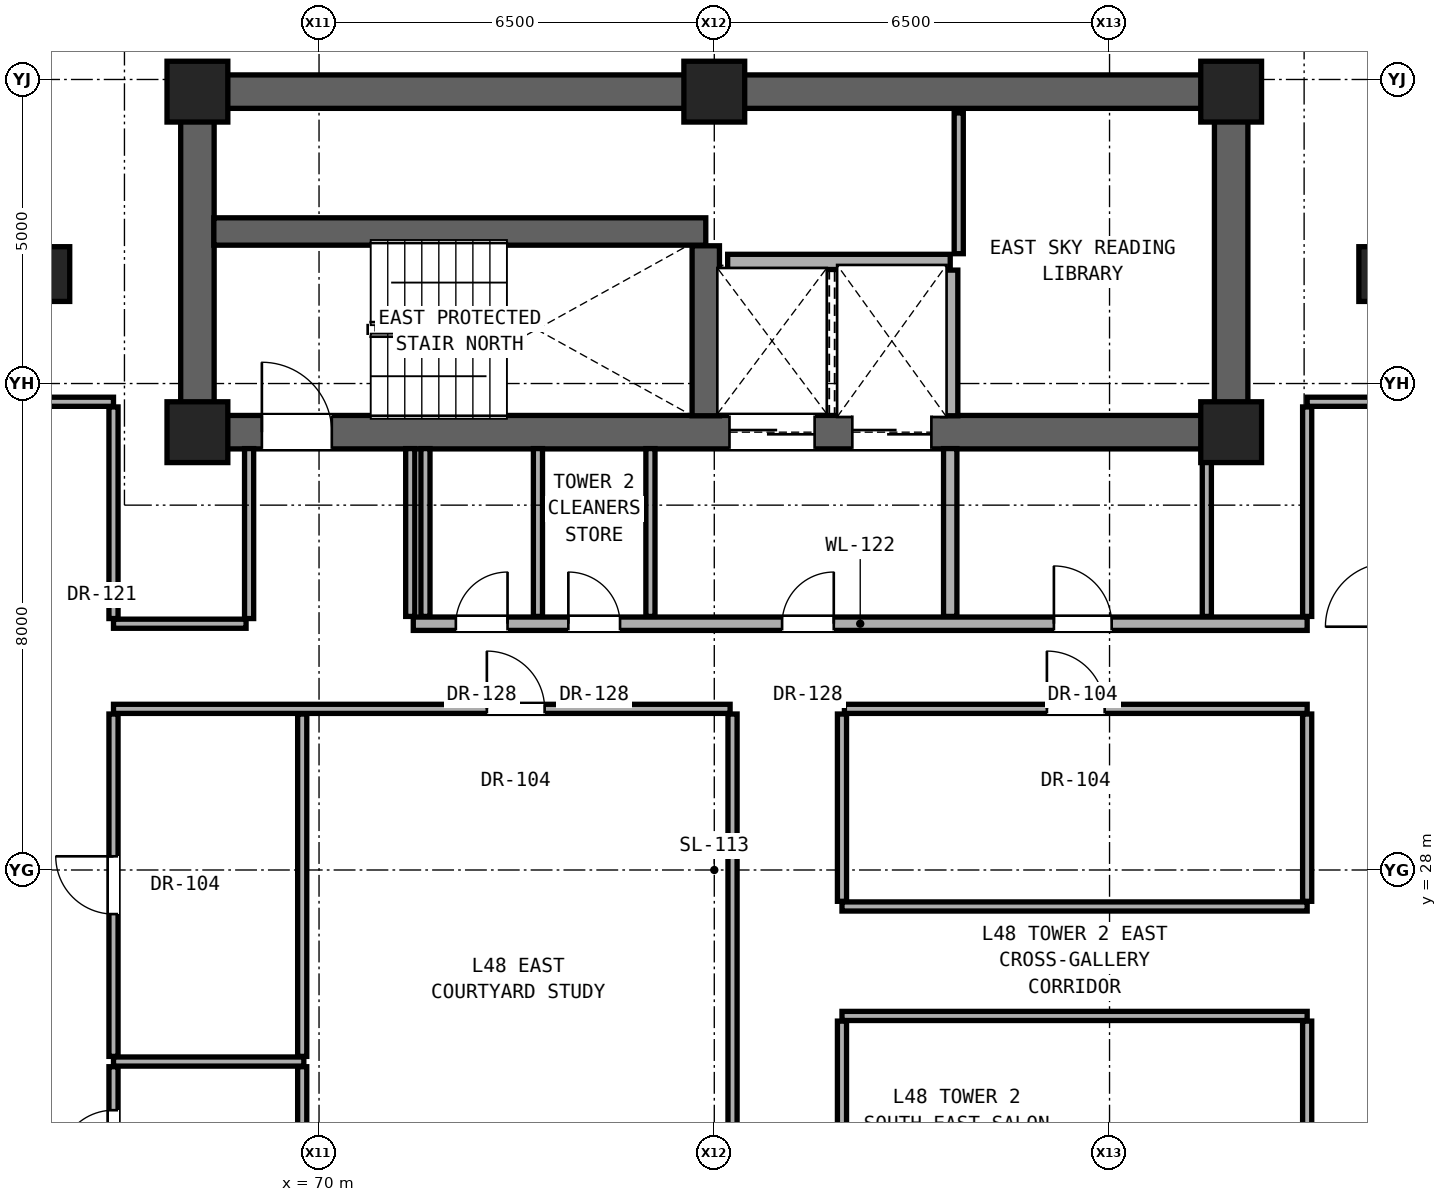
"""IFC4 building model, lengths in metres.
Left out: names, types, materials, properties, quantities, classifications, styles, units other than length and angle.
Written with IfcOpenShell. Run it as: python <this file> out.ifc"""

import sys

from ifc_helpers import new_model, si_unit, direction, frame, frame_2d, origin, origin_2d, place, context, subcontext, project, spatial, rectangle, extrude, element, fill, save


model = new_model("IFC4")
c1 = context("Model", 3, precision=1e-05, world=origin(), true_north=direction((0.0, 1.0)))
c2 = subcontext(c1, "Body", "Model", "MODEL_VIEW")
j1 = project(units=[si_unit("LENGTHUNIT", "METRE"), si_unit("PLANEANGLEUNIT", "RADIAN")], contexts=[c1])
p1 = place(None, origin())
s1 = spatial("IfcSite", under=j1, at=p1, CompositionType="ELEMENT")
p2 = place(p1, origin())
s2 = spatial("IfcBuilding", under=s1, at=p2, CompositionType="ELEMENT")
p3 = place(p2, frame((0.0, 0.0, 170.65)))
s3 = spatial("IfcBuildingStorey", under=s2, at=p3, CompositionType="ELEMENT", Elevation=170.65)
for number, where, z_axis, x_axis in (
    (1, (68.0, 35.2, 0.0), (0.0, 0.0, 1.0), (1.0, 0.0, 0.0)),
    (2, (85.0, 35.2, 0.0), (0.0, 0.0, 1.0), (1.0, 0.0, 0.0)),
    (3, (68.0, 40.8, 0.0), (0.0, 0.0, 1.0), (1.0, 0.0, 0.0)),
    (4, (76.5, 40.8, 0.0), (0.0, 0.0, 1.0), (1.0, 0.0, 0.0)),
    (5, (85.0, 40.8, 0.0), (0.0, 0.0, 1.0), (1.0, 0.0, 0.0)),
):
    element("IfcColumn", number, at=place(p3, frame(where, z_axis=z_axis, x_axis=x_axis)), inside=s3, PredefinedType="COLUMN", context=c2, shape_type="SweptSolid", body=[
        extrude(rectangle(XDim=1.0, YDim=1.0, at=origin_2d()), origin(), (0.0, 0.0, 1.0), 3.25),
    ])
for number, where, z_axis, x_axis in (
    (6, (65.6, 37.8, 0.0), (0.0, 0.0, 1.0), (1.0, 0.0, 0.0)),
    (7, (87.4, 37.8, 0.0), (0.0, 0.0, 1.0), (1.0, 0.0, 0.0)),
):
    element("IfcColumn", number, at=place(p3, frame(where, z_axis=z_axis, x_axis=x_axis)), inside=s3, PredefinedType="PILASTER", context=c2, shape_type="SweptSolid", body=[
        extrude(rectangle(XDim=0.6, YDim=0.9, at=origin_2d()), origin(), (0.0, 0.0, 1.0), 3.25),
    ])
p4 = place(p3, frame((68.0, 40.8, 0.0), z_axis=(0.0, 0.0, 1.0), x_axis=(1.0, 0.0, 0.0)))
e8 = element("IfcWall", 8, at=p4, inside=s3, PredefinedType="SHEAR", context=c2, shape_type="SweptSolid", body=[
    extrude(rectangle(XDim=17.0, YDim=0.55, at=frame_2d((8.5, 0.0))), origin(), (0.0, 0.0, 1.0), 3.05),
])
for number, where, z_axis, x_axis in (
    (9, (68.0, 35.2, 0.0), (0.0, 0.0, 1.0), (0.0, 1.0, 0.0)),
    (10, (85.0, 35.2, 0.0), (0.0, 0.0, 1.0), (0.0, 1.0, 0.0)),
):
    element("IfcWall", number, at=place(p3, frame(where, z_axis=z_axis, x_axis=x_axis)), inside=s3, PredefinedType="SHEAR", context=c2, shape_type="SweptSolid", body=[
        extrude(rectangle(XDim=5.6, YDim=0.55, at=frame_2d((2.8, 0.0))), origin(), (0.0, 0.0, 1.0), 3.05),
    ])
p5 = place(p3, frame((68.0, 35.2, 0.0), z_axis=(0.0, 0.0, 1.0), x_axis=(1.0, 0.0, 0.0)))
e11 = element("IfcWall", 11, at=p5, inside=s3, PredefinedType="SHEAR", context=c2, shape_type="SweptSolid", body=[
    extrude(rectangle(XDim=17.0, YDim=0.55, at=frame_2d((8.5, 0.0))), origin(), (0.0, 0.0, 1.0), 3.05),
])
p6 = place(p5, frame((1.06, 0.0, 0.0)))
e12 = element("IfcOpeningElement", 12, at=p6, cuts=e11, PredefinedType="OPENING", context=c2, shape_type="SweptSolid", body=[
    extrude(rectangle(XDim=1.15, YDim=2.2, at=frame_2d((0.575, 1.1))), frame((0.0, 0.285, 0.0), z_axis=(0.0, -1.0, 0.0), x_axis=(1.0, 0.0, 0.0)), (0.0, 0.0, 1.0), 0.57),
])
p7 = place(p5, frame((8.75, 0.0, 0.0)))
e13 = element("IfcOpeningElement", 13, at=p7, cuts=e11, PredefinedType="OPENING", context=c2, shape_type="SweptSolid", body=[
    extrude(rectangle(XDim=1.4, YDim=2.35, at=frame_2d((0.7, 1.175))), frame((0.0, 0.285, 0.0), z_axis=(0.0, -1.0, 0.0), x_axis=(1.0, 0.0, 0.0)), (0.0, 0.0, 1.0), 0.57),
])
p8 = place(p5, frame((10.77, 0.0, 0.0)))
e14 = element("IfcOpeningElement", 14, at=p8, cuts=e11, PredefinedType="OPENING", context=c2, shape_type="SweptSolid", body=[
    extrude(rectangle(XDim=1.3, YDim=2.3, at=frame_2d((0.65, 1.15))), frame((0.0, 0.285, 0.0), z_axis=(0.0, -1.0, 0.0), x_axis=(1.0, 0.0, 0.0)), (0.0, 0.0, 1.0), 0.57),
])
p9 = place(p3, frame((66.62, 24.85, 0.0), z_axis=(0.0, 0.0, 1.0), x_axis=(1.0, 0.0, 0.0)))
e15 = element("IfcWall", 15, at=p9, inside=s3, PredefinedType="PARTITIONING", context=c2, shape_type="SweptSolid", body=[
    extrude(rectangle(XDim=3.13, YDim=0.15, at=frame_2d((1.565, 0.0))), origin(), (0.0, 0.0, 1.0), 2.186),
])
for number, where, z_axis, x_axis in (
    (16, (78.6, 25.6, 0.0), (0.0, 0.0, 1.0), (1.0, 0.0, 0.0)),
    (17, (78.6, 27.4, 0.0), (0.0, 0.0, 1.0), (1.0, 0.0, 0.0)),
):
    element("IfcWall", number, at=place(p3, frame(where, z_axis=z_axis, x_axis=x_axis)), inside=s3, PredefinedType="PARTITIONING", context=c2, shape_type="SweptSolid", body=[
        extrude(rectangle(XDim=7.65, YDim=0.15, at=frame_2d((3.825, 0.0))), origin(), (0.0, 0.0, 1.0), 2.186),
    ])
p10 = place(p3, frame((66.62, 30.65, 0.0), z_axis=(0.0, 0.0, 1.0), x_axis=(1.0, 0.0, 0.0)))
e18 = element("IfcWall", 18, at=p10, inside=s3, PredefinedType="PARTITIONING", context=c2, shape_type="SweptSolid", body=[
    extrude(rectangle(XDim=10.14, YDim=0.15, at=frame_2d((5.07, 0.0))), origin(), (0.0, 0.0, 1.0), 2.186),
])
p11 = place(p10, frame((6.14, 0.0, 0.0)))
e19 = element("IfcOpeningElement", 19, at=p11, cuts=e18, PredefinedType="OPENING", context=c2, shape_type="SweptSolid", body=[
    extrude(rectangle(XDim=0.95, YDim=2.15, at=frame_2d((0.475, 1.075))), frame((0.0, 0.085, 0.0), z_axis=(0.0, -1.0, 0.0), x_axis=(1.0, 0.0, 0.0)), (0.0, 0.0, 1.0), 0.17),
])
p12 = place(p3, frame((78.64, 30.65, 0.0), z_axis=(0.0, 0.0, 1.0), x_axis=(1.0, 0.0, 0.0)))
e20 = element("IfcWall", 20, at=p12, inside=s3, PredefinedType="PARTITIONING", context=c2, shape_type="SweptSolid", body=[
    extrude(rectangle(XDim=7.61, YDim=0.15, at=frame_2d((3.805, 0.0))), origin(), (0.0, 0.0, 1.0), 2.186),
])
p13 = place(p12, frame((3.33, 0.0, 0.0)))
e21 = element("IfcOpeningElement", 21, at=p13, cuts=e20, PredefinedType="OPENING", context=c2, shape_type="SweptSolid", body=[
    extrude(rectangle(XDim=0.95, YDim=2.15, at=frame_2d((0.475, 1.075))), frame((0.0, 0.085, 0.0), z_axis=(0.0, -1.0, 0.0), x_axis=(1.0, 0.0, 0.0)), (0.0, 0.0, 1.0), 0.17),
])
p14 = place(p3, frame((66.62, 32.05, 0.0), z_axis=(0.0, 0.0, 1.0), x_axis=(1.0, 0.0, 0.0)))
e22 = element("IfcWall", 22, at=p14, inside=s3, PredefinedType="PARTITIONING", context=c2, shape_type="SweptSolid", body=[
    extrude(rectangle(XDim=2.18, YDim=0.15, at=frame_2d((1.09, 0.0))), origin(), (0.0, 0.0, 1.0), 2.186),
])
p15 = place(p3, frame((71.55, 32.05, 0.0), z_axis=(0.0, 0.0, 1.0), x_axis=(1.0, 0.0, 0.0)))
e23 = element("IfcWall", 23, at=p15, inside=s3, PredefinedType="SOLIDWALL", context=c2, shape_type="SweptSolid", body=[
    extrude(rectangle(XDim=14.7, YDim=0.22, at=frame_2d((7.35, 0.0))), origin(), (0.0, 0.0, 1.0), 2.186),
])
p16 = place(p15, frame((6.065, 0.0, 0.0)))
e24 = element("IfcOpeningElement", 24, at=p16, cuts=e23, PredefinedType="OPENING", context=c2, shape_type="SweptSolid", body=[
    extrude(rectangle(XDim=0.85, YDim=2.01, at=frame_2d((0.425, 1.005))), frame((0.0, 0.12, 0.0), z_axis=(0.0, -1.0, 0.0), x_axis=(1.0, 0.0, 0.0)), (0.0, 0.0, 1.0), 0.24),
])
p17 = place(p15, frame((10.535, 0.0, 0.0)))
e25 = element("IfcOpeningElement", 25, at=p17, cuts=e23, PredefinedType="OPENING", context=c2, shape_type="SweptSolid", body=[
    extrude(rectangle(XDim=0.95, YDim=2.15, at=frame_2d((0.475, 1.075))), frame((0.0, 0.12, 0.0), z_axis=(0.0, -1.0, 0.0), x_axis=(1.0, 0.0, 0.0)), (0.0, 0.0, 1.0), 0.24),
])
p18 = place(p15, frame((0.7, 0.0, 0.0)))
e26 = element("IfcOpeningElement", 26, at=p18, cuts=e23, PredefinedType="OPENING", context=c2, shape_type="SweptSolid", body=[
    extrude(rectangle(XDim=0.85, YDim=2.01, at=frame_2d((0.425, 1.005))), frame((0.0, 0.12, 0.0), z_axis=(0.0, -1.0, 0.0), x_axis=(1.0, 0.0, 0.0)), (0.0, 0.0, 1.0), 0.24),
])
p19 = place(p15, frame((2.55, 0.0, 0.0)))
e27 = element("IfcOpeningElement", 27, at=p19, cuts=e23, PredefinedType="OPENING", context=c2, shape_type="SweptSolid", body=[
    extrude(rectangle(XDim=0.85, YDim=2.01, at=frame_2d((0.425, 1.005))), frame((0.0, 0.12, 0.0), z_axis=(0.0, -1.0, 0.0), x_axis=(1.0, 0.0, 0.0)), (0.0, 0.0, 1.0), 0.24),
])
p20 = place(p3, frame((65.25, 35.7, 0.0), z_axis=(0.0, 0.0, 1.0), x_axis=(1.0, 0.0, 0.0)))
e28 = element("IfcWall", 28, at=p20, inside=s3, PredefinedType="PARTITIONING", context=c2, shape_type="SweptSolid", body=[
    extrude(rectangle(XDim=1.37, YDim=0.15, at=frame_2d((0.685, 0.0))), origin(), (0.0, 0.0, 1.0), 3.05),
])
p21 = place(p3, frame((86.25, 35.7, 0.0), z_axis=(0.0, 0.0, 1.0), x_axis=(1.0, 0.0, 0.0)))
e29 = element("IfcWall", 29, at=p21, inside=s3, PredefinedType="PARTITIONING", context=c2, shape_type="SweptSolid", body=[
    extrude(rectangle(XDim=1.35, YDim=0.15, at=frame_2d((0.675, 0.0))), origin(), (0.0, 0.0, 1.0), 3.05),
])
p22 = place(p3, frame((76.72, 38.0, 0.0), z_axis=(0.0, 0.0, 1.0), x_axis=(1.0, 0.0, 0.0)))
e30 = element("IfcWall", 30, at=p22, inside=s3, PredefinedType="SOLIDWALL", context=c2, shape_type="SweptSolid", body=[
    extrude(rectangle(XDim=3.66, YDim=0.25, at=frame_2d((1.83, 0.0))), origin(), (0.0, 0.0, 1.0), 3.05),
])
p23 = place(p3, frame((68.27, 38.5, 0.0), z_axis=(0.0, 0.0, 1.0), x_axis=(1.0, 0.0, 0.0)))
e31 = element("IfcWall", 31, at=p23, inside=s3, PredefinedType="SHEAR", context=c2, shape_type="SweptSolid", body=[
    extrude(rectangle(XDim=8.09, YDim=0.45, at=frame_2d((4.045, 0.0))), origin(), (0.0, 0.0, 1.0), 3.05),
])
p24 = place(p3, frame((66.62, 22.435, 0.0), z_axis=(0.0, 0.0, 1.0), x_axis=(0.0, 1.0, 0.0)))
e32 = element("IfcWall", 32, at=p24, inside=s3, PredefinedType="PARTITIONING", context=c2, shape_type="SweptSolid", body=[
    extrude(rectangle(XDim=2.33, YDim=0.15, at=frame_2d((1.165, 0.0))), origin(), (0.0, 0.0, 1.0), 3.05),
])
p25 = place(p24, frame((0.715, 0.0, 0.0)))
e33 = element("IfcOpeningElement", 33, at=p25, cuts=e32, PredefinedType="OPENING", context=c2, shape_type="SweptSolid", body=[
    extrude(rectangle(XDim=0.9, YDim=2.1, at=frame_2d((0.45, 1.05))), frame((0.0, 0.085, 0.0), z_axis=(0.0, -1.0, 0.0), x_axis=(1.0, 0.0, 0.0)), (0.0, 0.0, 1.0), 0.17),
])
p26 = place(p3, frame((66.62, 24.935, 0.0), z_axis=(0.0, 0.0, 1.0), x_axis=(0.0, 1.0, 0.0)))
e34 = element("IfcWall", 34, at=p26, inside=s3, PredefinedType="PARTITIONING", context=c2, shape_type="SweptSolid", body=[
    extrude(rectangle(XDim=5.63, YDim=0.15, at=frame_2d((2.815, 0.0))), origin(), (0.0, 0.0, 1.0), 2.346),
])
p27 = place(p26, frame((2.34, 0.0, 0.0)))
e35 = element("IfcOpeningElement", 35, at=p27, cuts=e34, PredefinedType="OPENING", context=c2, shape_type="SweptSolid", body=[
    extrude(rectangle(XDim=0.95, YDim=2.15, at=frame_2d((0.475, 1.075))), frame((0.0, 0.085, 0.0), z_axis=(0.0, -1.0, 0.0), x_axis=(1.0, 0.0, 0.0)), (0.0, 0.0, 1.0), 0.17),
])
p28 = place(p3, frame((66.62, 32.135, 0.0), z_axis=(0.0, 0.0, 1.0), x_axis=(0.0, 1.0, 0.0)))
e36 = element("IfcWall", 36, at=p28, inside=s3, PredefinedType="PARTITIONING", context=c2, shape_type="SweptSolid", body=[
    extrude(rectangle(XDim=3.48, YDim=0.15, at=frame_2d((1.74, 0.0))), origin(), (0.0, 0.0, 1.0), 2.442),
])
p29 = place(p3, frame((68.85, 32.135, 0.0), z_axis=(0.0, 0.0, 1.0), x_axis=(0.0, 1.0, 0.0)))
e37 = element("IfcWall", 37, at=p29, inside=s3, PredefinedType="PARTITIONING", context=c2, shape_type="SweptSolid", body=[
    extrude(rectangle(XDim=2.795, YDim=0.15, at=frame_2d((1.397, 0.0))), origin(), (0.0, 0.0, 1.0), 3.05),
])
p30 = place(p3, frame((69.723, 22.435, 0.0), z_axis=(0.0, 0.0, 1.0), x_axis=(0.0, 1.0, 0.0)))
e38 = element("IfcWall", 38, at=p30, inside=s3, PredefinedType="PARTITIONING", context=c2, shape_type="SweptSolid", body=[
    extrude(rectangle(XDim=2.33, YDim=0.15, at=frame_2d((1.165, 0.0))), origin(), (0.0, 0.0, 1.0), 3.05),
])
p31 = place(p3, frame((69.723, 24.935, 0.0), z_axis=(0.0, 0.0, 1.0), x_axis=(0.0, 1.0, 0.0)))
e39 = element("IfcWall", 39, at=p31, inside=s3, PredefinedType="PARTITIONING", context=c2, shape_type="SweptSolid", body=[
    extrude(rectangle(XDim=5.63, YDim=0.15, at=frame_2d((2.815, 0.0))), origin(), (0.0, 0.0, 1.0), 2.186),
])
for number, where, z_axis, x_axis in (
    (40, (71.5, 32.17, 0.0), (0.0, 0.0, 1.0), (0.0, 1.0, 0.0)),
    (41, (71.75, 32.17, 0.0), (0.0, 0.0, 1.0), (0.0, 1.0, 0.0)),
    (42, (73.6, 32.17, 0.0), (0.0, 0.0, 1.0), (0.0, 1.0, 0.0)),
    (43, (75.45, 32.17, 0.0), (0.0, 0.0, 1.0), (0.0, 1.0, 0.0)),
):
    element("IfcWall", number, at=place(p3, frame(where, z_axis=z_axis, x_axis=x_axis)), inside=s3, PredefinedType="PARTITIONING", context=c2, shape_type="SweptSolid", body=[
        extrude(rectangle(XDim=2.76, YDim=0.15, at=frame_2d((1.38, 0.0))), origin(), (0.0, 0.0, 1.0), 3.05),
    ])
p32 = place(p3, frame((76.36, 35.47, 0.0), z_axis=(0.0, 0.0, 1.0), x_axis=(0.0, 1.0, 0.0)))
e44 = element("IfcWall", 44, at=p32, inside=s3, PredefinedType="SHEAR", context=c2, shape_type="SweptSolid", body=[
    extrude(rectangle(XDim=2.795, YDim=0.45, at=frame_2d((1.397, 0.0))), origin(), (0.0, 0.0, 1.0), 3.05),
])
p33 = place(p3, frame((76.8, 22.435, 0.0), z_axis=(0.0, 0.0, 1.0), x_axis=(0.0, 1.0, 0.0)))
e45 = element("IfcWall", 45, at=p33, inside=s3, PredefinedType="PARTITIONING", context=c2, shape_type="SweptSolid", body=[
    extrude(rectangle(XDim=8.13, YDim=0.15, at=frame_2d((4.065, 0.0))), origin(), (0.0, 0.0, 1.0), 2.186),
])
p34 = place(p3, frame((78.6, 22.435, 0.0), z_axis=(0.0, 0.0, 1.0), x_axis=(0.0, 1.0, 0.0)))
e46 = element("IfcWall", 46, at=p34, inside=s3, PredefinedType="PARTITIONING", context=c2, shape_type="SweptSolid", body=[
    extrude(rectangle(XDim=3.08, YDim=0.15, at=frame_2d((1.54, 0.0))), origin(), (0.0, 0.0, 1.0), 3.05),
])
p35 = place(p3, frame((78.6, 27.485, 0.0), z_axis=(0.0, 0.0, 1.0), x_axis=(0.0, 1.0, 0.0)))
e47 = element("IfcWall", 47, at=p35, inside=s3, PredefinedType="PARTITIONING", context=c2, shape_type="SweptSolid", body=[
    extrude(rectangle(XDim=3.08, YDim=0.15, at=frame_2d((1.54, 0.0))), origin(), (0.0, 0.0, 1.0), 2.186),
])
p36 = place(p3, frame((80.38, 32.17, 0.0), z_axis=(0.0, 0.0, 1.0), x_axis=(0.0, 1.0, 0.0)))
e48 = element("IfcWall", 48, at=p36, inside=s3, PredefinedType="SOLIDWALL", context=c2, shape_type="SweptSolid", body=[
    extrude(rectangle(XDim=2.76, YDim=0.22, at=frame_2d((1.38, 0.0))), origin(), (0.0, 0.0, 1.0), 3.05),
])
p37 = place(p3, frame((80.38, 35.47, 0.0), z_axis=(0.0, 0.0, 1.0), x_axis=(0.0, 1.0, 0.0)))
e49 = element("IfcWall", 49, at=p37, inside=s3, PredefinedType="SOLIDWALL", context=c2, shape_type="SweptSolid", body=[
    extrude(rectangle(XDim=2.395, YDim=0.25, at=frame_2d((1.198, 0.0))), origin(), (0.0, 0.0, 1.0), 3.05),
])
p38 = place(p3, frame((80.52, 38.135, 0.0), z_axis=(0.0, 0.0, 1.0), x_axis=(0.0, 1.0, 0.0)))
e50 = element("IfcWall", 50, at=p38, inside=s3, PredefinedType="PARTITIONING", context=c2, shape_type="SweptSolid", body=[
    extrude(rectangle(XDim=2.315, YDim=0.15, at=frame_2d((1.157, 0.0))), origin(), (0.0, 0.0, 1.0), 3.05),
])
p39 = place(p3, frame((84.6, 32.17, 0.0), z_axis=(0.0, 0.0, 1.0), x_axis=(0.0, 1.0, 0.0)))
e51 = element("IfcWall", 51, at=p39, inside=s3, PredefinedType="PARTITIONING", context=c2, shape_type="SweptSolid", body=[
    extrude(rectangle(XDim=2.76, YDim=0.15, at=frame_2d((1.38, 0.0))), origin(), (0.0, 0.0, 1.0), 3.05),
])
p40 = place(p3, frame((86.25, 22.435, 0.0), z_axis=(0.0, 0.0, 1.0), x_axis=(0.0, 1.0, 0.0)))
e52 = element("IfcWall", 52, at=p40, inside=s3, PredefinedType="PARTITIONING", context=c2, shape_type="SweptSolid", body=[
    extrude(rectangle(XDim=3.08, YDim=0.15, at=frame_2d((1.54, 0.0))), origin(), (0.0, 0.0, 1.0), 3.05),
])
p41 = place(p3, frame((86.25, 27.485, 0.0), z_axis=(0.0, 0.0, 1.0), x_axis=(0.0, 1.0, 0.0)))
e53 = element("IfcWall", 53, at=p41, inside=s3, PredefinedType="PARTITIONING", context=c2, shape_type="SweptSolid", body=[
    extrude(rectangle(XDim=3.08, YDim=0.15, at=frame_2d((1.54, 0.0))), origin(), (0.0, 0.0, 1.0), 2.346),
])
p42 = place(p3, frame((86.25, 32.17, 0.0), z_axis=(0.0, 0.0, 1.0), x_axis=(0.0, 1.0, 0.0)))
e54 = element("IfcWall", 54, at=p42, inside=s3, PredefinedType="PARTITIONING", context=c2, shape_type="SweptSolid", body=[
    extrude(rectangle(XDim=3.445, YDim=0.15, at=frame_2d((1.723, 0.0))), origin(), (0.0, 0.0, 1.0), 2.442),
])
p43 = place(p6, origin())
e55 = element("IfcDoor", 55, at=p43, inside=s3, OperationType="SINGLE_SWING_LEFT", PredefinedType="DOOR", context=c2, shape_type="SweptSolid", body=[
    extrude(rectangle(XDim=1.15, YDim=2.2, at=frame_2d((0.575, 1.1))), frame((0.0, 0.025, 0.0), z_axis=(0.0, -1.0, 0.0), x_axis=(1.0, 0.0, 0.0)), (0.0, 0.0, 1.0), 0.05),
])
fill(e12, e55)
p44 = place(p16, origin())
e56 = element("IfcDoor", 56, at=p44, inside=s3, OperationType="SINGLE_SWING_RIGHT", PredefinedType="DOOR", context=c2, shape_type="SweptSolid", body=[
    extrude(rectangle(XDim=0.85, YDim=2.01, at=frame_2d((0.425, 1.005))), frame((0.0, 0.025, 0.0), z_axis=(0.0, -1.0, 0.0), x_axis=(1.0, 0.0, 0.0)), (0.0, 0.0, 1.0), 0.05),
])
fill(e24, e56)
p45 = place(p17, origin())
e57 = element("IfcDoor", 57, at=p45, inside=s3, OperationType="SINGLE_SWING_LEFT", PredefinedType="DOOR", context=c2, shape_type="SweptSolid", body=[
    extrude(rectangle(XDim=0.95, YDim=2.15, at=frame_2d((0.475, 1.075))), frame((0.0, 0.025, 0.0), z_axis=(0.0, -1.0, 0.0), x_axis=(1.0, 0.0, 0.0)), (0.0, 0.0, 1.0), 0.05),
])
fill(e25, e57)
p46 = place(p18, origin())
e58 = element("IfcDoor", 58, at=p46, inside=s3, OperationType="SINGLE_SWING_RIGHT", PredefinedType="DOOR", context=c2, shape_type="SweptSolid", body=[
    extrude(rectangle(XDim=0.85, YDim=2.01, at=frame_2d((0.425, 1.005))), frame((0.0, 0.025, 0.0), z_axis=(0.0, -1.0, 0.0), x_axis=(1.0, 0.0, 0.0)), (0.0, 0.0, 1.0), 0.05),
])
fill(e26, e58)
p47 = place(p19, origin())
e59 = element("IfcDoor", 59, at=p47, inside=s3, OperationType="SINGLE_SWING_LEFT", PredefinedType="DOOR", context=c2, shape_type="SweptSolid", body=[
    extrude(rectangle(XDim=0.85, YDim=2.01, at=frame_2d((0.425, 1.005))), frame((0.0, 0.025, 0.0), z_axis=(0.0, -1.0, 0.0), x_axis=(1.0, 0.0, 0.0)), (0.0, 0.0, 1.0), 0.05),
])
fill(e27, e59)
p48 = place(p25, origin())
e60 = element("IfcDoor", 60, at=p48, inside=s3, OperationType="SINGLE_SWING_LEFT", PredefinedType="DOOR", context=c2, shape_type="SweptSolid", body=[
    extrude(rectangle(XDim=0.9, YDim=2.1, at=frame_2d((0.45, 1.05))), frame((0.0, 0.025, 0.0), z_axis=(0.0, -1.0, 0.0), x_axis=(1.0, 0.0, 0.0)), (0.0, 0.0, 1.0), 0.05),
])
fill(e33, e60)
p49 = place(p27, origin())
e61 = element("IfcDoor", 61, at=p49, inside=s3, OperationType="SINGLE_SWING_RIGHT", PredefinedType="DOOR", context=c2, shape_type="SweptSolid", body=[
    extrude(rectangle(XDim=0.95, YDim=2.15, at=frame_2d((0.475, 1.075))), frame((0.0, 0.025, 0.0), z_axis=(0.0, -1.0, 0.0), x_axis=(1.0, 0.0, 0.0)), (0.0, 0.0, 1.0), 0.05),
])
fill(e35, e61)
p50 = place(p11, origin())
e62 = element("IfcDoor", 62, at=p50, inside=s3, OperationType="SINGLE_SWING_LEFT", PredefinedType="DOOR", context=c2, shape_type="SweptSolid", body=[
    extrude(rectangle(XDim=0.95, YDim=2.15, at=frame_2d((0.475, 1.075))), frame((0.0, 0.025, 0.0), z_axis=(0.0, -1.0, 0.0), x_axis=(1.0, 0.0, 0.0)), (0.0, 0.0, 1.0), 0.05),
])
fill(e19, e62)
p51 = place(p13, origin())
e63 = element("IfcDoor", 63, at=p51, inside=s3, OperationType="SINGLE_SWING_LEFT", PredefinedType="DOOR", context=c2, shape_type="SweptSolid", body=[
    extrude(rectangle(XDim=0.95, YDim=2.15, at=frame_2d((0.475, 1.075))), frame((0.0, 0.025, 0.0), z_axis=(0.0, -1.0, 0.0), x_axis=(1.0, 0.0, 0.0)), (0.0, 0.0, 1.0), 0.05),
])
fill(e21, e63)
p52 = place(p7, origin())
e64 = element("IfcDoor", 64, at=p52, inside=s3, OperationType="DOUBLE_DOOR_SLIDING", PredefinedType="DOOR", context=c2, shape_type="SweptSolid", body=[
    extrude(rectangle(XDim=1.4, YDim=2.35, at=frame_2d((0.7, 1.175))), frame((0.0, 0.025, 0.0), z_axis=(0.0, -1.0, 0.0), x_axis=(1.0, 0.0, 0.0)), (0.0, 0.0, 1.0), 0.05),
])
fill(e13, e64)
p53 = place(p8, origin())
e65 = element("IfcDoor", 65, at=p53, inside=s3, OperationType="DOUBLE_DOOR_SLIDING", PredefinedType="DOOR", context=c2, shape_type="SweptSolid", body=[
    extrude(rectangle(XDim=1.3, YDim=2.3, at=frame_2d((0.65, 1.15))), frame((0.0, 0.025, 0.0), z_axis=(0.0, -1.0, 0.0), x_axis=(1.0, 0.0, 0.0)), (0.0, 0.0, 1.0), 0.05),
])
fill(e14, e65)
save(model, sys.argv[1])
